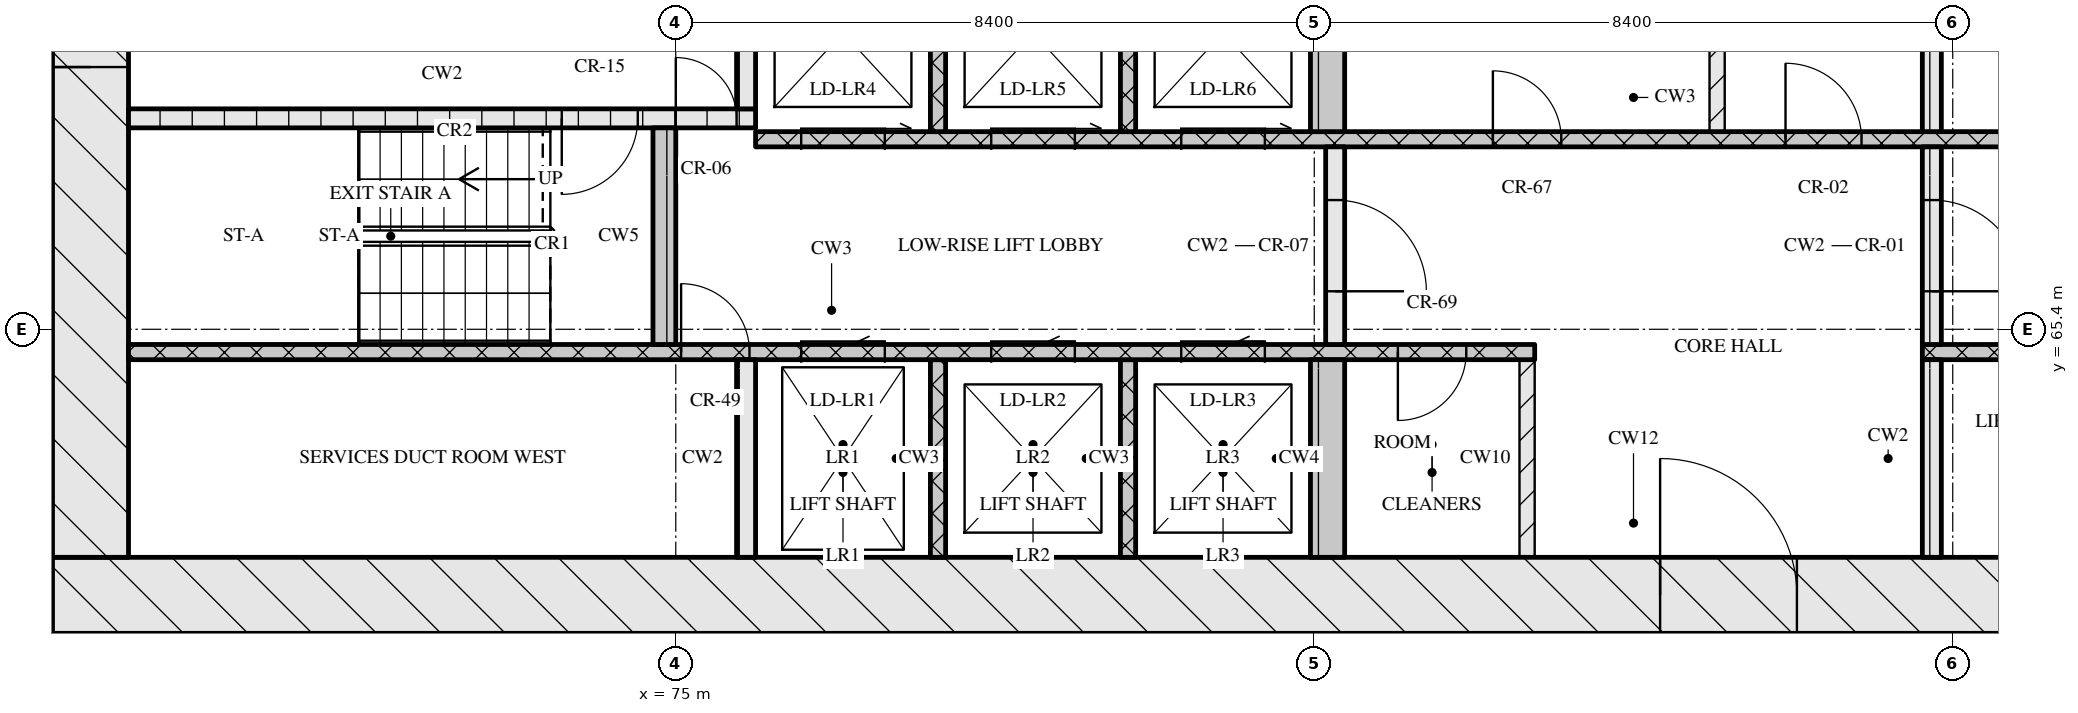
"""IFC4 building model, lengths in metres.
Left out: names, types, materials, properties, quantities, classifications, styles, units other than length and angle.
Written with IfcOpenShell. Run it as: python <this file> out.ifc"""

import sys

from ifc_helpers import new_model, si_unit, direction, frame, frame_2d, origin, place, context, subcontext, project, spatial, rectangle, extrude, element, fill, save


model = new_model("IFC4")
c1 = context("Model", 3, precision=1e-05, world=origin(), true_north=direction((0.0, 1.0)))
c2 = subcontext(c1, "Body", "Model", "MODEL_VIEW")
j1 = project(units=[si_unit("LENGTHUNIT", "METRE"), si_unit("PLANEANGLEUNIT", "RADIAN")], contexts=[c1])
p1 = place(None, origin())
s1 = spatial("IfcSite", under=j1, at=p1, CompositionType="ELEMENT")
p2 = place(p1, origin())
s2 = spatial("IfcBuilding", under=s1, at=p2, CompositionType="ELEMENT")
p3 = place(p2, frame((0.0, 0.0, 109.65)))
s3 = spatial("IfcBuildingStorey", under=s2, at=p3, CompositionType="ELEMENT", Elevation=109.65)
p4 = place(p3, frame((66.8, 61.9, 0.0), z_axis=(0.0, 0.0, 1.0), x_axis=(1.0, 0.0, 0.0)))
e1 = element("IfcWall", 1, at=p4, inside=s3, PredefinedType="SOLIDWALL", context=c2, shape_type="SweptSolid", body=[
    extrude(rectangle(XDim=41.6, YDim=1.0, at=frame_2d((20.8, 0.0))), origin(), (0.0, 0.0, 1.0), 3.32),
])
p5 = place(p4, frame((21.15, 0.0, 0.0)))
e2 = element("IfcOpeningElement", 2, at=p5, cuts=e1, PredefinedType="OPENING", context=c2, shape_type="SweptSolid", body=[
    extrude(rectangle(XDim=1.8, YDim=2.1, at=frame_2d((0.9, 1.05))), frame((0.0, 0.51, 0.0), z_axis=(0.0, -1.0, 0.0), x_axis=(1.0, 0.0, 0.0)), (0.0, 0.0, 1.0), 1.02),
])
p6 = place(p3, frame((67.3, 62.4, 0.0), z_axis=(0.0, 0.0, 1.0), x_axis=(0.0, 1.0, 0.0)))
e3 = element("IfcWall", 3, at=p6, inside=s3, PredefinedType="SOLIDWALL", context=c2, shape_type="SweptSolid", body=[
    extrude(rectangle(XDim=12.0, YDim=1.0, at=frame_2d((6.0, 0.0))), origin(), (0.0, 0.0, 1.0), 3.32),
])
p7 = place(p6, frame((6.45, 0.0, 0.0)))
e4 = element("IfcOpeningElement", 4, at=p7, cuts=e3, PredefinedType="OPENING", context=c2, shape_type="SweptSolid", body=[
    extrude(rectangle(XDim=1.2, YDim=2.1, at=frame_2d((0.6, 1.05))), frame((0.0, 0.51, 0.0), z_axis=(0.0, -1.0, 0.0), x_axis=(1.0, 0.0, 0.0)), (0.0, 0.0, 1.0), 1.02),
])
p8 = place(p3, frame((75.925, 62.4, 0.0), z_axis=(0.0, 0.0, 1.0), x_axis=(0.0, 1.0, 0.0)))
e5 = element("IfcWall", 5, at=p8, inside=s3, PredefinedType="SOLIDWALL", context=c2, shape_type="SweptSolid", body=[
    extrude(rectangle(XDim=2.6, YDim=0.25, at=frame_2d((1.3, 0.0))), origin(), (0.0, 0.0, 1.0), 3.32),
])
for number, where, z_axis, x_axis in (
    (6, (78.45, 62.4, 0.0), (0.0, 0.0, 1.0), (0.0, 1.0, 0.0)),
    (7, (80.95, 62.4, 0.0), (0.0, 0.0, 1.0), (0.0, 1.0, 0.0)),
):
    element("IfcWall", number, at=place(p3, frame(where, z_axis=z_axis, x_axis=x_axis)), inside=s3, PredefinedType="SOLIDWALL", context=c2, shape_type="SweptSolid", body=[
        extrude(rectangle(XDim=2.6, YDim=0.2, at=frame_2d((1.3, 0.0))), origin(), (0.0, 0.0, 1.0), 3.32),
    ])
p9 = place(p3, frame((83.575, 62.4, 0.0), z_axis=(0.0, 0.0, 1.0), x_axis=(0.0, 1.0, 0.0)))
e8 = element("IfcWall", 8, at=p9, inside=s3, PredefinedType="SOLIDWALL", context=c2, shape_type="SweptSolid", body=[
    extrude(rectangle(XDim=2.6, YDim=0.45, at=frame_2d((1.3, 0.0))), origin(), (0.0, 0.0, 1.0), 3.32),
])
p10 = place(p3, frame((86.2, 62.4, 0.0), z_axis=(0.0, 0.0, 1.0), x_axis=(0.0, 1.0, 0.0)))
e9 = element("IfcWall", 9, at=p10, inside=s3, PredefinedType="PARTITIONING", context=c2, shape_type="SweptSolid", body=[
    extrude(rectangle(XDim=2.6, YDim=0.2, at=frame_2d((1.3, 0.0))), origin(), (0.0, 0.0, 1.0), 3.32),
])
p11 = place(p3, frame((91.525, 62.4, 0.0), z_axis=(0.0, 0.0, 1.0), x_axis=(0.0, 1.0, 0.0)))
e10 = element("IfcWall", 10, at=p11, inside=s3, PredefinedType="SOLIDWALL", context=c2, shape_type="SweptSolid", body=[
    extrude(rectangle(XDim=2.6, YDim=0.25, at=frame_2d((1.3, 0.0))), origin(), (0.0, 0.0, 1.0), 3.32),
])
p12 = place(p3, frame((67.8, 65.1, 0.0), z_axis=(0.0, 0.0, 1.0), x_axis=(1.0, 0.0, 0.0)))
e11 = element("IfcWall", 11, at=p12, inside=s3, PredefinedType="SOLIDWALL", context=c2, shape_type="SweptSolid", body=[
    extrude(rectangle(XDim=18.5, YDim=0.2, at=frame_2d((9.25, 0.0))), origin(), (0.0, 0.0, 1.0), 3.32),
])
p13 = place(p12, frame((7.27, 0.0, 0.0)))
e12 = element("IfcOpeningElement", 12, at=p13, cuts=e11, PredefinedType="OPENING", context=c2, shape_type="SweptSolid", body=[
    extrude(rectangle(XDim=0.9, YDim=2.1, at=frame_2d((0.45, 1.05))), frame((0.0, 0.11, 0.0), z_axis=(0.0, -1.0, 0.0), x_axis=(1.0, 0.0, 0.0)), (0.0, 0.0, 1.0), 0.22),
])
p14 = place(p12, frame((8.85, 0.0, 0.0)))
e13 = element("IfcOpeningElement", 13, at=p14, cuts=e11, PredefinedType="OPENING", context=c2, shape_type="SweptSolid", body=[
    extrude(rectangle(XDim=1.1, YDim=2.1, at=frame_2d((0.55, 1.05))), frame((0.0, 0.11, 0.0), z_axis=(0.0, -1.0, 0.0), x_axis=(1.0, 0.0, 0.0)), (0.0, 0.0, 1.0), 0.22),
])
p15 = place(p12, frame((11.35, 0.0, 0.0)))
e14 = element("IfcOpeningElement", 14, at=p15, cuts=e11, PredefinedType="OPENING", context=c2, shape_type="SweptSolid", body=[
    extrude(rectangle(XDim=1.1, YDim=2.1, at=frame_2d((0.55, 1.05))), frame((0.0, 0.11, 0.0), z_axis=(0.0, -1.0, 0.0), x_axis=(1.0, 0.0, 0.0)), (0.0, 0.0, 1.0), 0.22),
])
p16 = place(p12, frame((13.85, 0.0, 0.0)))
e15 = element("IfcOpeningElement", 15, at=p16, cuts=e11, PredefinedType="OPENING", context=c2, shape_type="SweptSolid", body=[
    extrude(rectangle(XDim=1.1, YDim=2.1, at=frame_2d((0.55, 1.05))), frame((0.0, 0.11, 0.0), z_axis=(0.0, -1.0, 0.0), x_axis=(1.0, 0.0, 0.0)), (0.0, 0.0, 1.0), 0.22),
])
p17 = place(p12, frame((16.7, 0.0, 0.0)))
e16 = element("IfcOpeningElement", 16, at=p17, cuts=e11, PredefinedType="OPENING", context=c2, shape_type="SweptSolid", body=[
    extrude(rectangle(XDim=0.9, YDim=2.1, at=frame_2d((0.45, 1.05))), frame((0.0, 0.11, 0.0), z_axis=(0.0, -1.0, 0.0), x_axis=(1.0, 0.0, 0.0)), (0.0, 0.0, 1.0), 0.22),
])
p18 = place(p3, frame((91.4, 65.1, 0.0), z_axis=(0.0, 0.0, 1.0), x_axis=(1.0, 0.0, 0.0)))
e17 = element("IfcWall", 17, at=p18, inside=s3, PredefinedType="SOLIDWALL", context=c2, shape_type="SweptSolid", body=[
    extrude(rectangle(XDim=16.0, YDim=0.2, at=frame_2d((8.0, 0.0))), origin(), (0.0, 0.0, 1.0), 3.32),
])
p19 = place(p18, frame((7.83, 0.0, 0.0)))
e18 = element("IfcOpeningElement", 18, at=p19, cuts=e17, PredefinedType="OPENING", context=c2, shape_type="SweptSolid", body=[
    extrude(rectangle(XDim=0.9, YDim=2.1, at=frame_2d((0.45, 1.05))), frame((0.0, 0.11, 0.0), z_axis=(0.0, -1.0, 0.0), x_axis=(1.0, 0.0, 0.0)), (0.0, 0.0, 1.0), 0.22),
])
p20 = place(p3, frame((74.85, 65.2, 0.0), z_axis=(0.0, 0.0, 1.0), x_axis=(0.0, 1.0, 0.0)))
e19 = element("IfcWall", 19, at=p20, inside=s3, PredefinedType="SOLIDWALL", context=c2, shape_type="SweptSolid", body=[
    extrude(rectangle(XDim=2.85, YDim=0.3, at=frame_2d((1.425, 0.0))), origin(), (0.0, 0.0, 1.0), 3.32),
])
p21 = place(p3, frame((83.675, 65.2, 0.0), z_axis=(0.0, 0.0, 1.0), x_axis=(0.0, 1.0, 0.0)))
e20 = element("IfcWall", 20, at=p21, inside=s3, PredefinedType="SOLIDWALL", context=c2, shape_type="SweptSolid", body=[
    extrude(rectangle(XDim=2.6, YDim=0.25, at=frame_2d((1.3, 0.0))), origin(), (0.0, 0.0, 1.0), 3.32),
])
p22 = place(p21, frame((0.7, 0.0, 0.0)))
e21 = element("IfcOpeningElement", 21, at=p22, cuts=e20, PredefinedType="OPENING", context=c2, shape_type="SweptSolid", body=[
    extrude(rectangle(XDim=1.2, YDim=2.1, at=frame_2d((0.6, 1.05))), frame((0.0, 0.135, 0.0), z_axis=(0.0, -1.0, 0.0), x_axis=(1.0, 0.0, 0.0)), (0.0, 0.0, 1.0), 0.27),
])
p23 = place(p3, frame((91.525, 65.2, 0.0), z_axis=(0.0, 0.0, 1.0), x_axis=(0.0, 1.0, 0.0)))
e22 = element("IfcWall", 22, at=p23, inside=s3, PredefinedType="SOLIDWALL", context=c2, shape_type="SweptSolid", body=[
    extrude(rectangle(XDim=2.6, YDim=0.25, at=frame_2d((1.3, 0.0))), origin(), (0.0, 0.0, 1.0), 3.32),
])
p24 = place(p23, frame((0.7, 0.0, 0.0)))
e23 = element("IfcOpeningElement", 23, at=p24, cuts=e22, PredefinedType="OPENING", context=c2, shape_type="SweptSolid", body=[
    extrude(rectangle(XDim=1.2, YDim=2.1, at=frame_2d((0.6, 1.05))), frame((0.0, 0.135, 0.0), z_axis=(0.0, -1.0, 0.0), x_axis=(1.0, 0.0, 0.0)), (0.0, 0.0, 1.0), 0.27),
])
p25 = place(p3, frame((76.05, 67.9, 0.0), z_axis=(0.0, 0.0, 1.0), x_axis=(1.0, 0.0, 0.0)))
e24 = element("IfcWall", 24, at=p25, inside=s3, PredefinedType="SOLIDWALL", context=c2, shape_type="SweptSolid", body=[
    extrude(rectangle(XDim=23.1, YDim=0.2, at=frame_2d((11.55, 0.0))), origin(), (0.0, 0.0, 1.0), 3.32),
])
p26 = place(p25, frame((0.6, 0.0, 0.0)))
e25 = element("IfcOpeningElement", 25, at=p26, cuts=e24, PredefinedType="OPENING", context=c2, shape_type="SweptSolid", body=[
    extrude(rectangle(XDim=1.1, YDim=2.1, at=frame_2d((0.55, 1.05))), frame((0.0, 0.11, 0.0), z_axis=(0.0, -1.0, 0.0), x_axis=(1.0, 0.0, 0.0)), (0.0, 0.0, 1.0), 0.22),
])
p27 = place(p25, frame((3.1, 0.0, 0.0)))
e26 = element("IfcOpeningElement", 26, at=p27, cuts=e24, PredefinedType="OPENING", context=c2, shape_type="SweptSolid", body=[
    extrude(rectangle(XDim=1.1, YDim=2.1, at=frame_2d((0.55, 1.05))), frame((0.0, 0.11, 0.0), z_axis=(0.0, -1.0, 0.0), x_axis=(1.0, 0.0, 0.0)), (0.0, 0.0, 1.0), 0.22),
])
p28 = place(p25, frame((5.6, 0.0, 0.0)))
e27 = element("IfcOpeningElement", 27, at=p28, cuts=e24, PredefinedType="OPENING", context=c2, shape_type="SweptSolid", body=[
    extrude(rectangle(XDim=1.1, YDim=2.1, at=frame_2d((0.55, 1.05))), frame((0.0, 0.11, 0.0), z_axis=(0.0, -1.0, 0.0), x_axis=(1.0, 0.0, 0.0)), (0.0, 0.0, 1.0), 0.22),
])
p29 = place(p25, frame((9.7, 0.0, 0.0)))
e28 = element("IfcOpeningElement", 28, at=p29, cuts=e24, PredefinedType="OPENING", context=c2, shape_type="SweptSolid", body=[
    extrude(rectangle(XDim=0.9, YDim=2.1, at=frame_2d((0.45, 1.05))), frame((0.0, 0.11, 0.0), z_axis=(0.0, -1.0, 0.0), x_axis=(1.0, 0.0, 0.0)), (0.0, 0.0, 1.0), 0.22),
])
p30 = place(p25, frame((13.55, 0.0, 0.0)))
e29 = element("IfcOpeningElement", 29, at=p30, cuts=e24, PredefinedType="OPENING", context=c2, shape_type="SweptSolid", body=[
    extrude(rectangle(XDim=1.0, YDim=2.1, at=frame_2d((0.5, 1.05))), frame((0.0, 0.11, 0.0), z_axis=(0.0, -1.0, 0.0), x_axis=(1.0, 0.0, 0.0)), (0.0, 0.0, 1.0), 0.22),
])
for number, where, z_axis, x_axis in (
    (30, (78.45, 68.0, 0.0), (0.0, 0.0, 1.0), (0.0, 1.0, 0.0)),
    (31, (80.95, 68.0, 0.0), (0.0, 0.0, 1.0), (0.0, 1.0, 0.0)),
):
    element("IfcWall", number, at=place(p3, frame(where, z_axis=z_axis, x_axis=x_axis)), inside=s3, PredefinedType="SOLIDWALL", context=c2, shape_type="SweptSolid", body=[
        extrude(rectangle(XDim=2.6, YDim=0.2, at=frame_2d((1.3, 0.0))), origin(), (0.0, 0.0, 1.0), 3.32),
    ])
p31 = place(p3, frame((83.575, 68.0, 0.0), z_axis=(0.0, 0.0, 1.0), x_axis=(0.0, 1.0, 0.0)))
e32 = element("IfcWall", 32, at=p31, inside=s3, PredefinedType="SOLIDWALL", context=c2, shape_type="SweptSolid", body=[
    extrude(rectangle(XDim=2.6, YDim=0.45, at=frame_2d((1.3, 0.0))), origin(), (0.0, 0.0, 1.0), 3.32),
])
p32 = place(p3, frame((88.7, 68.0, 0.0), z_axis=(0.0, 0.0, 1.0), x_axis=(0.0, 1.0, 0.0)))
e33 = element("IfcWall", 33, at=p32, inside=s3, PredefinedType="PARTITIONING", context=c2, shape_type="SweptSolid", body=[
    extrude(rectangle(XDim=2.6, YDim=0.2, at=frame_2d((1.3, 0.0))), origin(), (0.0, 0.0, 1.0), 3.32),
])
p33 = place(p3, frame((91.525, 68.0, 0.0), z_axis=(0.0, 0.0, 1.0), x_axis=(0.0, 1.0, 0.0)))
e34 = element("IfcWall", 34, at=p33, inside=s3, PredefinedType="SOLIDWALL", context=c2, shape_type="SweptSolid", body=[
    extrude(rectangle(XDim=2.6, YDim=0.25, at=frame_2d((1.3, 0.0))), origin(), (0.0, 0.0, 1.0), 3.32),
])
p34 = place(p3, frame((67.8, 68.175, 0.0), z_axis=(0.0, 0.0, 1.0), x_axis=(1.0, 0.0, 0.0)))
e35 = element("IfcWall", 35, at=p34, inside=s3, PredefinedType="SOLIDWALL", context=c2, shape_type="SweptSolid", body=[
    extrude(rectangle(XDim=8.25, YDim=0.25, at=frame_2d((4.125, 0.0))), origin(), (0.0, 0.0, 1.0), 3.32),
])
p35 = place(p34, frame((5.7, 0.0, 0.0)))
e36 = element("IfcOpeningElement", 36, at=p35, cuts=e35, PredefinedType="OPENING", context=c2, shape_type="SweptSolid", body=[
    extrude(rectangle(XDim=1.0, YDim=2.1, at=frame_2d((0.5, 1.05))), frame((0.0, 0.135, 0.0), z_axis=(0.0, -1.0, 0.0), x_axis=(1.0, 0.0, 0.0)), (0.0, 0.0, 1.0), 0.27),
])
p36 = place(p34, frame((7.2, 0.0, 0.0)))
e37 = element("IfcOpeningElement", 37, at=p36, cuts=e35, PredefinedType="OPENING", context=c2, shape_type="SweptSolid", body=[
    extrude(rectangle(XDim=0.8, YDim=2.1, at=frame_2d((0.4, 1.05))), frame((0.0, 0.135, 0.0), z_axis=(0.0, -1.0, 0.0), x_axis=(1.0, 0.0, 0.0)), (0.0, 0.0, 1.0), 0.27),
])
p37 = place(p3, frame((75.925, 68.3, 0.0), z_axis=(0.0, 0.0, 1.0), x_axis=(0.0, 1.0, 0.0)))
e38 = element("IfcWall", 38, at=p37, inside=s3, PredefinedType="SOLIDWALL", context=c2, shape_type="SweptSolid", body=[
    extrude(rectangle(XDim=2.3, YDim=0.25, at=frame_2d((1.15, 0.0))), origin(), (0.0, 0.0, 1.0), 3.32),
])
p38 = place(p5, origin())
e39 = element("IfcDoor", 39, at=p38, inside=s3, OperationType="DOUBLE_DOOR_SINGLE_SWING", PredefinedType="DOOR", context=c2, shape_type="SweptSolid", body=[
    extrude(rectangle(XDim=1.8, YDim=2.1, at=frame_2d((0.9, 1.05))), frame((0.0, 0.025, 0.0), z_axis=(0.0, -1.0, 0.0), x_axis=(1.0, 0.0, 0.0)), (0.0, 0.0, 1.0), 0.05),
])
fill(e2, e39)
p39 = place(p13, origin())
e40 = element("IfcDoor", 40, at=p39, inside=s3, OperationType="SINGLE_SWING_LEFT", PredefinedType="DOOR", context=c2, shape_type="SweptSolid", body=[
    extrude(rectangle(XDim=0.9, YDim=2.1, at=frame_2d((0.45, 1.05))), frame((0.0, 0.025, 0.0), z_axis=(0.0, -1.0, 0.0), x_axis=(1.0, 0.0, 0.0)), (0.0, 0.0, 1.0), 0.05),
])
fill(e12, e40)
p40 = place(p14, origin())
e41 = element("IfcDoor", 41, at=p40, inside=s3, OperationType="SLIDING_TO_LEFT", PredefinedType="DOOR", context=c2, shape_type="SweptSolid", body=[
    extrude(rectangle(XDim=1.1, YDim=2.1, at=frame_2d((0.55, 1.05))), frame((0.0, 0.025, 0.0), z_axis=(0.0, -1.0, 0.0), x_axis=(1.0, 0.0, 0.0)), (0.0, 0.0, 1.0), 0.05),
])
fill(e13, e41)
p41 = place(p15, origin())
e42 = element("IfcDoor", 42, at=p41, inside=s3, OperationType="SLIDING_TO_LEFT", PredefinedType="DOOR", context=c2, shape_type="SweptSolid", body=[
    extrude(rectangle(XDim=1.1, YDim=2.1, at=frame_2d((0.55, 1.05))), frame((0.0, 0.025, 0.0), z_axis=(0.0, -1.0, 0.0), x_axis=(1.0, 0.0, 0.0)), (0.0, 0.0, 1.0), 0.05),
])
fill(e14, e42)
p42 = place(p16, origin())
e43 = element("IfcDoor", 43, at=p42, inside=s3, OperationType="SLIDING_TO_LEFT", PredefinedType="DOOR", context=c2, shape_type="SweptSolid", body=[
    extrude(rectangle(XDim=1.1, YDim=2.1, at=frame_2d((0.55, 1.05))), frame((0.0, 0.025, 0.0), z_axis=(0.0, -1.0, 0.0), x_axis=(1.0, 0.0, 0.0)), (0.0, 0.0, 1.0), 0.05),
])
fill(e15, e43)
p43 = place(p17, origin())
e44 = element("IfcDoor", 44, at=p43, inside=s3, OperationType="SINGLE_SWING_RIGHT", PredefinedType="DOOR", context=c2, shape_type="SweptSolid", body=[
    extrude(rectangle(XDim=0.9, YDim=2.1, at=frame_2d((0.45, 1.05))), frame((0.0, 0.025, 0.0), z_axis=(0.0, -1.0, 0.0), x_axis=(1.0, 0.0, 0.0)), (0.0, 0.0, 1.0), 0.05),
])
fill(e16, e44)
p44 = place(p22, origin())
e45 = element("IfcDoor", 45, at=p44, inside=s3, OperationType="SINGLE_SWING_RIGHT", PredefinedType="DOOR", context=c2, shape_type="SweptSolid", body=[
    extrude(rectangle(XDim=1.2, YDim=2.1, at=frame_2d((0.6, 1.05))), frame((0.0, 0.025, 0.0), z_axis=(0.0, -1.0, 0.0), x_axis=(1.0, 0.0, 0.0)), (0.0, 0.0, 1.0), 0.05),
])
fill(e21, e45)
p45 = place(p24, origin())
e46 = element("IfcDoor", 46, at=p45, inside=s3, OperationType="SINGLE_SWING_RIGHT", PredefinedType="DOOR", context=c2, shape_type="SweptSolid", body=[
    extrude(rectangle(XDim=1.2, YDim=2.1, at=frame_2d((0.6, 1.05))), frame((0.0, 0.025, 0.0), z_axis=(0.0, -1.0, 0.0), x_axis=(1.0, 0.0, 0.0)), (0.0, 0.0, 1.0), 0.05),
])
fill(e23, e46)
p46 = place(p26, origin())
e47 = element("IfcDoor", 47, at=p46, inside=s3, OperationType="SLIDING_TO_RIGHT", PredefinedType="DOOR", context=c2, shape_type="SweptSolid", body=[
    extrude(rectangle(XDim=1.1, YDim=2.1, at=frame_2d((0.55, 1.05))), frame((0.0, 0.025, 0.0), z_axis=(0.0, -1.0, 0.0), x_axis=(1.0, 0.0, 0.0)), (0.0, 0.0, 1.0), 0.05),
])
fill(e25, e47)
p47 = place(p27, origin())
e48 = element("IfcDoor", 48, at=p47, inside=s3, OperationType="SLIDING_TO_RIGHT", PredefinedType="DOOR", context=c2, shape_type="SweptSolid", body=[
    extrude(rectangle(XDim=1.1, YDim=2.1, at=frame_2d((0.55, 1.05))), frame((0.0, 0.025, 0.0), z_axis=(0.0, -1.0, 0.0), x_axis=(1.0, 0.0, 0.0)), (0.0, 0.0, 1.0), 0.05),
])
fill(e26, e48)
p48 = place(p28, origin())
e49 = element("IfcDoor", 49, at=p48, inside=s3, OperationType="SLIDING_TO_RIGHT", PredefinedType="DOOR", context=c2, shape_type="SweptSolid", body=[
    extrude(rectangle(XDim=1.1, YDim=2.1, at=frame_2d((0.55, 1.05))), frame((0.0, 0.025, 0.0), z_axis=(0.0, -1.0, 0.0), x_axis=(1.0, 0.0, 0.0)), (0.0, 0.0, 1.0), 0.05),
])
fill(e27, e49)
p49 = place(p29, origin())
e50 = element("IfcDoor", 50, at=p49, inside=s3, OperationType="SINGLE_SWING_LEFT", PredefinedType="DOOR", context=c2, shape_type="SweptSolid", body=[
    extrude(rectangle(XDim=0.9, YDim=2.1, at=frame_2d((0.45, 1.05))), frame((0.0, 0.025, 0.0), z_axis=(0.0, -1.0, 0.0), x_axis=(1.0, 0.0, 0.0)), (0.0, 0.0, 1.0), 0.05),
])
fill(e28, e50)
p50 = place(p30, origin())
e51 = element("IfcDoor", 51, at=p50, inside=s3, OperationType="SINGLE_SWING_LEFT", PredefinedType="DOOR", context=c2, shape_type="SweptSolid", body=[
    extrude(rectangle(XDim=1.0, YDim=2.1, at=frame_2d((0.5, 1.05))), frame((0.0, 0.025, 0.0), z_axis=(0.0, -1.0, 0.0), x_axis=(1.0, 0.0, 0.0)), (0.0, 0.0, 1.0), 0.05),
])
fill(e29, e51)
p51 = place(p35, origin())
e52 = element("IfcDoor", 52, at=p51, inside=s3, OperationType="SINGLE_SWING_RIGHT", PredefinedType="DOOR", context=c2, shape_type="SweptSolid", body=[
    extrude(rectangle(XDim=1.0, YDim=2.1, at=frame_2d((0.5, 1.05))), frame((0.0, 0.025, 0.0), z_axis=(0.0, -1.0, 0.0), x_axis=(1.0, 0.0, 0.0)), (0.0, 0.0, 1.0), 0.05),
])
fill(e36, e52)
p52 = place(p36, origin())
e53 = element("IfcDoor", 53, at=p52, inside=s3, OperationType="SINGLE_SWING_LEFT", PredefinedType="DOOR", context=c2, shape_type="SweptSolid", body=[
    extrude(rectangle(XDim=0.8, YDim=2.1, at=frame_2d((0.4, 1.05))), frame((0.0, 0.025, 0.0), z_axis=(0.0, -1.0, 0.0), x_axis=(1.0, 0.0, 0.0)), (0.0, 0.0, 1.0), 0.05),
])
fill(e37, e53)
p53 = place(p7, origin())
e54 = element("IfcDoor", 54, at=p53, inside=s3, OperationType="SINGLE_SWING_LEFT", PredefinedType="DOOR", context=c2, shape_type="SweptSolid", body=[
    extrude(rectangle(XDim=1.2, YDim=2.1, at=frame_2d((0.6, 1.05))), frame((0.0, 0.025, 0.0), z_axis=(0.0, -1.0, 0.0), x_axis=(1.0, 0.0, 0.0)), (0.0, 0.0, 1.0), 0.05),
])
fill(e4, e54)
save(model, sys.argv[1])
